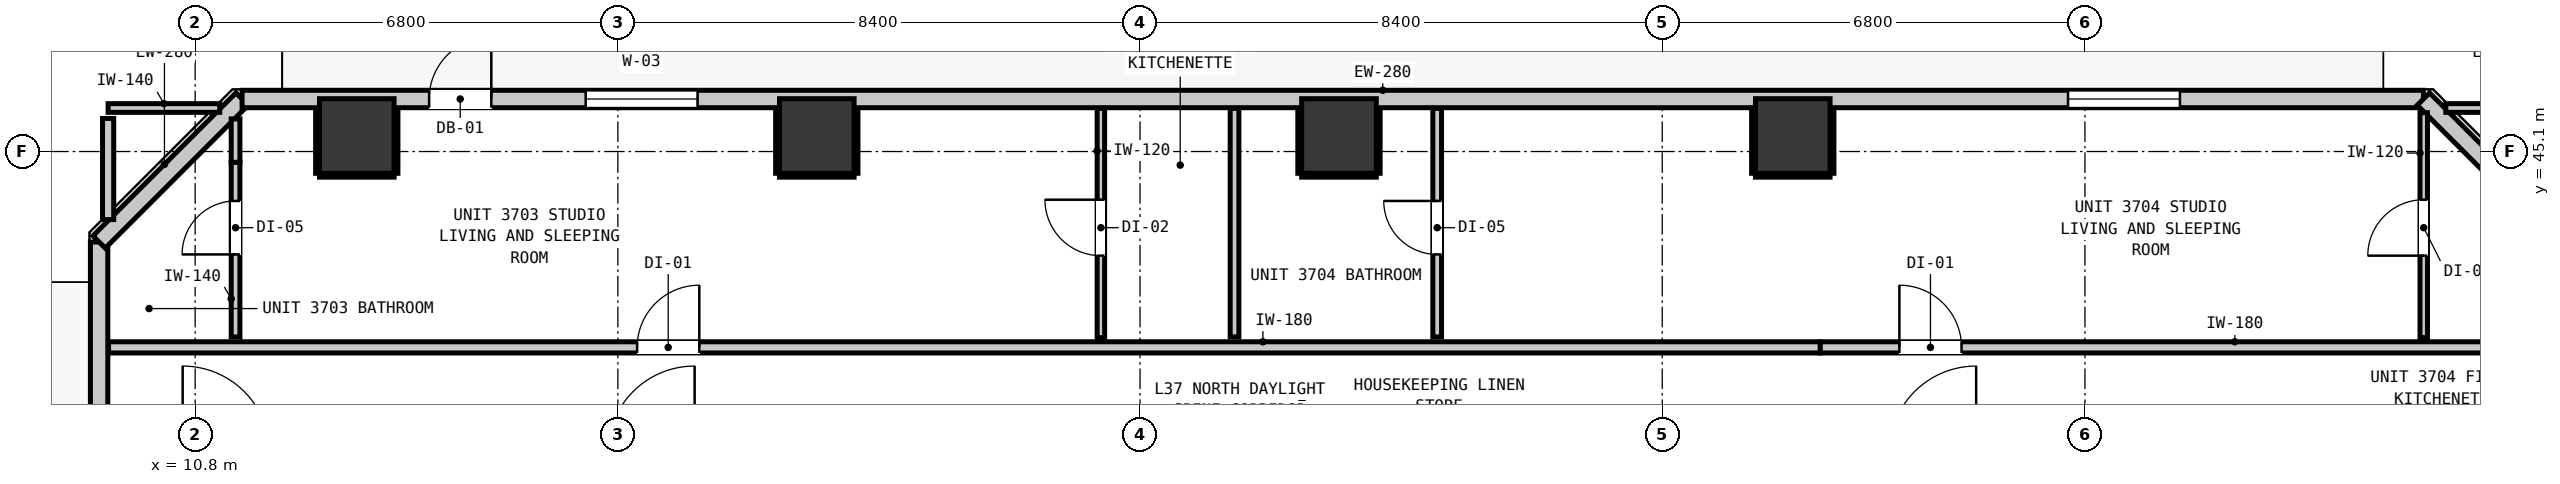
"""IFC4 building model, lengths in metres.
Left out: names, types, materials, properties, quantities, classifications, styles, units other than length and angle.
Written with IfcOpenShell. Run it as: python <this file> out.ifc"""

import sys

from ifc_helpers import new_model, si_unit, direction, frame, frame_2d, origin, origin_2d, place, context, subcontext, project, spatial, rectangle, extrude, element, fill, save


model = new_model("IFC4")
c1 = context("Model", 3, precision=1e-05, world=origin(), true_north=direction((0.0, 1.0)))
c2 = subcontext(c1, "Body", "Model", "MODEL_VIEW")
j1 = project(units=[si_unit("LENGTHUNIT", "METRE"), si_unit("PLANEANGLEUNIT", "RADIAN")], contexts=[c1])
p1 = place(None, origin())
s1 = spatial("IfcSite", under=j1, at=p1, CompositionType="ELEMENT")
p2 = place(p1, origin())
s2 = spatial("IfcBuilding", under=s1, at=p2, CompositionType="ELEMENT")
p3 = place(p2, frame((0.0, 0.0, 129.32)))
s3 = spatial("IfcBuildingStorey", under=s2, at=p3, CompositionType="ELEMENT", Elevation=129.32)
for number, where, z_axis, x_axis in (
    (1, (13.4, 45.35, 0.0), (0.0, 0.0, 1.0), (1.0, 0.0, 0.0)),
    (2, (20.8, 45.35, 0.0), (0.0, 0.0, 1.0), (1.0, 0.0, 0.0)),
    (3, (29.2, 45.35, 0.0), (0.0, 0.0, 1.0), (1.0, 0.0, 0.0)),
    (4, (36.5, 45.35, 0.0), (0.0, 0.0, 1.0), (1.0, 0.0, 0.0)),
):
    element("IfcColumn", number, at=place(p3, frame(where, z_axis=z_axis, x_axis=x_axis)), inside=s3, PredefinedType="COLUMN", context=c2, shape_type="SweptSolid", body=[
        extrude(rectangle(XDim=1.2, YDim=1.2, at=origin_2d()), origin(), (0.0, 0.0, 1.0), 3.32),
    ])
p4 = place(p3, frame((9.255, 11.355, 0.0), z_axis=(0.0, 0.0, 1.0), x_axis=(0.0, 1.0, 0.0)))
e5 = element("IfcWall", 5, at=p4, inside=s3, PredefinedType="STANDARD", context=c2, shape_type="SweptSolid", body=[
    extrude(rectangle(XDim=32.29, YDim=0.28, at=frame_2d((16.145, 0.0))), origin(), (0.0, 0.0, 1.0), 3.08),
])
p5 = place(p4, frame((5.818, 0.0, 0.0)))
e6 = element("IfcOpeningElement", 6, at=p5, cuts=e5, PredefinedType="OPENING", context=c2, shape_type="SweptSolid", body=[
    extrude(rectangle(XDim=1.0, YDim=2.15, at=frame_2d((0.5, 1.075))), frame((0.0, 0.15, 0.0), z_axis=(0.0, -1.0, 0.0), x_axis=(1.0, 0.0, 0.0)), (0.0, 0.0, 1.0), 0.3),
])
p6 = place(p4, frame((0.544, 0.0, 0.85)))
e7 = element("IfcOpeningElement", 7, at=p6, cuts=e5, PredefinedType="OPENING", context=c2, shape_type="SweptSolid", body=[
    extrude(rectangle(XDim=1.05, YDim=1.65, at=frame_2d((0.525, 0.825))), frame((0.0, 0.15, 0.0), z_axis=(0.0, -1.0, 0.0), x_axis=(1.0, 0.0, 0.0)), (0.0, 0.0, 1.0), 0.3),
])
p7 = place(p3, frame((9.255, 43.645, 0.0), z_axis=(0.0, 0.0, 1.0), x_axis=(0.707106781187, 0.707106781187, 0.0)))
e8 = element("IfcWall", 8, at=p7, inside=s3, PredefinedType="STANDARD", context=c2, shape_type="SweptSolid", body=[
    extrude(rectangle(XDim=3.253, YDim=0.28, at=frame_2d((1.626, 0.0))), origin(), (0.0, 0.0, 1.0), 3.08),
])
p8 = place(p3, frame((11.555, 45.945, 0.0), z_axis=(0.0, 0.0, 1.0), x_axis=(1.0, 0.0, 0.0)))
e9 = element("IfcWall", 9, at=p8, inside=s3, PredefinedType="STANDARD", context=c2, shape_type="SweptSolid", body=[
    extrude(rectangle(XDim=35.09, YDim=0.28, at=frame_2d((17.545, 0.0))), origin(), (0.0, 0.0, 1.0), 3.08),
])
p9 = place(p8, frame((3.009, 0.0, 0.0)))
e10 = element("IfcOpeningElement", 10, at=p9, cuts=e9, PredefinedType="OPENING", context=c2, shape_type="SweptSolid", body=[
    extrude(rectangle(XDim=1.0, YDim=2.15, at=frame_2d((0.5, 1.075))), frame((0.0, 0.15, 0.0), z_axis=(0.0, -1.0, 0.0), x_axis=(1.0, 0.0, 0.0)), (0.0, 0.0, 1.0), 0.3),
])
p10 = place(p8, frame((5.527, 0.0, 0.85)))
e11 = element("IfcOpeningElement", 11, at=p10, cuts=e9, PredefinedType="OPENING", context=c2, shape_type="SweptSolid", body=[
    extrude(rectangle(XDim=1.8, YDim=1.9, at=frame_2d((0.9, 0.95))), frame((0.0, 0.15, 0.0), z_axis=(0.0, -1.0, 0.0), x_axis=(1.0, 0.0, 0.0)), (0.0, 0.0, 1.0), 0.3),
])
p11 = place(p8, frame((29.373, 0.0, 0.85)))
e12 = element("IfcOpeningElement", 12, at=p11, cuts=e9, PredefinedType="OPENING", context=c2, shape_type="SweptSolid", body=[
    extrude(rectangle(XDim=1.8, YDim=1.9, at=frame_2d((0.9, 0.95))), frame((0.0, 0.15, 0.0), z_axis=(0.0, -1.0, 0.0), x_axis=(1.0, 0.0, 0.0)), (0.0, 0.0, 1.0), 0.3),
])
p12 = place(p3, frame((46.645, 45.945, 0.0), z_axis=(0.0, 0.0, 1.0), x_axis=(0.707106781187, -0.707106781187, 0.0)))
e13 = element("IfcWall", 13, at=p12, inside=s3, PredefinedType="STANDARD", context=c2, shape_type="SweptSolid", body=[
    extrude(rectangle(XDim=3.253, YDim=0.28, at=frame_2d((1.626, 0.0))), origin(), (0.0, 0.0, 1.0), 3.08),
])
p13 = place(p3, frame((9.407, 41.95, 0.0), z_axis=(0.0, 0.0, 1.0), x_axis=(1.0, 0.0, 0.0)))
e14 = element("IfcWall", 14, at=p13, inside=s3, PredefinedType="PARTITIONING", context=c2, shape_type="SweptSolid", body=[
    extrude(rectangle(XDim=27.536, YDim=0.18, at=frame_2d((13.768, 0.0))), origin(), (0.0, 0.0, 1.0), 3.08),
])
p14 = place(p13, frame((8.503, 0.0, 0.0)))
e15 = element("IfcOpeningElement", 15, at=p14, cuts=e14, PredefinedType="OPENING", context=c2, shape_type="SweptSolid", body=[
    extrude(rectangle(XDim=1.0, YDim=2.15, at=frame_2d((0.5, 1.075))), frame((0.0, 0.1, 0.0), z_axis=(0.0, -1.0, 0.0), x_axis=(1.0, 0.0, 0.0)), (0.0, 0.0, 1.0), 0.2),
])
p15 = place(p3, frame((36.943, 41.95, 0.0), z_axis=(0.0, 0.0, 1.0), x_axis=(1.0, 0.0, 0.0)))
e16 = element("IfcWall", 16, at=p15, inside=s3, PredefinedType="PARTITIONING", context=c2, shape_type="SweptSolid", body=[
    extrude(rectangle(XDim=10.964, YDim=0.18, at=frame_2d((5.482, 0.0))), origin(), (0.0, 0.0, 1.0), 2.565),
])
p16 = place(p15, frame((1.272, 0.0, 0.0)))
e17 = element("IfcOpeningElement", 17, at=p16, cuts=e16, PredefinedType="OPENING", context=c2, shape_type="SweptSolid", body=[
    extrude(rectangle(XDim=1.0, YDim=2.15, at=frame_2d((0.5, 1.075))), frame((0.0, 0.1, 0.0), z_axis=(0.0, -1.0, 0.0), x_axis=(1.0, 0.0, 0.0)), (0.0, 0.0, 1.0), 0.2),
])
for number, where, z_axis, x_axis in (
    (18, (9.4, 45.8, 0.0), (0.0, 0.0, 1.0), (1.0, 0.0, 0.0)),
    (19, (47.005, 45.8, 0.0), (0.0, 0.0, 1.0), (1.0, 0.0, 0.0)),
):
    element("IfcWall", number, at=place(p3, frame(where, z_axis=z_axis, x_axis=x_axis)), inside=s3, PredefinedType="PARTITIONING", context=c2, shape_type="SweptSolid", body=[
        extrude(rectangle(XDim=1.795, YDim=0.14, at=frame_2d((0.897, 0.0))), origin(), (0.0, 0.0, 1.0), 3.08),
    ])
p17 = place(p3, frame((9.4, 44.005, 0.0), z_axis=(0.0, 0.0, 1.0), x_axis=(0.0, 1.0, 0.0)))
e20 = element("IfcWall", 20, at=p17, inside=s3, PredefinedType="PARTITIONING", context=c2, shape_type="SweptSolid", body=[
    extrude(rectangle(XDim=1.627, YDim=0.18, at=frame_2d((0.813, 0.0))), origin(), (0.0, 0.0, 1.0), 3.08),
])
p18 = place(p3, frame((11.45, 42.118, 0.0), z_axis=(0.0, 0.0, 1.0), x_axis=(0.0, 1.0, 0.0)))
e21 = element("IfcWall", 21, at=p18, inside=s3, PredefinedType="PARTITIONING", context=c2, shape_type="SweptSolid", body=[
    extrude(rectangle(XDim=2.808, YDim=0.14, at=frame_2d((1.404, 0.0))), origin(), (0.0, 0.0, 1.0), 2.565),
])
p19 = place(p18, frame((1.327, 0.0, 0.0)))
e22 = element("IfcOpeningElement", 22, at=p19, cuts=e21, PredefinedType="OPENING", context=c2, shape_type="SweptSolid", body=[
    extrude(rectangle(XDim=0.86, YDim=2.02, at=frame_2d((0.43, 1.01))), frame((0.0, 0.08, 0.0), z_axis=(0.0, -1.0, 0.0), x_axis=(1.0, 0.0, 0.0)), (0.0, 0.0, 1.0), 0.16),
])
p20 = place(p3, frame((11.45, 44.926, 0.0), z_axis=(0.0, 0.0, 1.0), x_axis=(0.0, 1.0, 0.0)))
e23 = element("IfcWall", 23, at=p20, inside=s3, PredefinedType="PARTITIONING", context=c2, shape_type="SweptSolid", body=[
    extrude(rectangle(XDim=0.699, YDim=0.14, at=frame_2d((0.35, 0.0))), origin(), (0.0, 0.0, 1.0), 3.08),
])
p21 = place(p3, frame((27.52, 42.118, 0.0), z_axis=(0.0, 0.0, 1.0), x_axis=(0.0, 1.0, 0.0)))
e24 = element("IfcWall", 24, at=p21, inside=s3, PredefinedType="PARTITIONING", context=c2, shape_type="SweptSolid", body=[
    extrude(rectangle(XDim=3.675, YDim=0.14, at=frame_2d((1.837, 0.0))), origin(), (0.0, 0.0, 1.0), 3.08),
])
p22 = place(p3, frame((30.78, 42.118, 0.0), z_axis=(0.0, 0.0, 1.0), x_axis=(0.0, 1.0, 0.0)))
e25 = element("IfcWall", 25, at=p22, inside=s3, PredefinedType="PARTITIONING", context=c2, shape_type="SweptSolid", body=[
    extrude(rectangle(XDim=3.675, YDim=0.14, at=frame_2d((1.837, 0.0))), origin(), (0.0, 0.0, 1.0), 3.08),
])
p23 = place(p22, frame((1.327, 0.0, 0.0)))
e26 = element("IfcOpeningElement", 26, at=p23, cuts=e25, PredefinedType="OPENING", context=c2, shape_type="SweptSolid", body=[
    extrude(rectangle(XDim=0.86, YDim=2.02, at=frame_2d((0.43, 1.01))), frame((0.0, 0.08, 0.0), z_axis=(0.0, -1.0, 0.0), x_axis=(1.0, 0.0, 0.0)), (0.0, 0.0, 1.0), 0.16),
])
p24 = place(p3, frame((25.37, 42.108, 0.0), z_axis=(0.0, 0.0, 1.0), x_axis=(0.0, 1.0, 0.0)))
e27 = element("IfcWall", 27, at=p24, inside=s3, PredefinedType="PARTITIONING", context=c2, shape_type="SweptSolid", body=[
    extrude(rectangle(XDim=3.685, YDim=0.12, at=frame_2d((1.843, 0.0))), origin(), (0.0, 0.0, 1.0), 3.08),
])
p25 = place(p24, frame((1.317, 0.0, 0.0)))
e28 = element("IfcOpeningElement", 28, at=p25, cuts=e27, PredefinedType="OPENING", context=c2, shape_type="SweptSolid", body=[
    extrude(rectangle(XDim=0.9, YDim=2.1, at=frame_2d((0.45, 1.05))), frame((0.0, 0.07, 0.0), z_axis=(0.0, -1.0, 0.0), x_axis=(1.0, 0.0, 0.0)), (0.0, 0.0, 1.0), 0.14),
])
p26 = place(p3, frame((46.65, 42.108, 0.0), z_axis=(0.0, 0.0, 1.0), x_axis=(0.0, 1.0, 0.0)))
e29 = element("IfcWall", 29, at=p26, inside=s3, PredefinedType="PARTITIONING", context=c2, shape_type="SweptSolid", body=[
    extrude(rectangle(XDim=3.617, YDim=0.12, at=frame_2d((1.809, 0.0))), origin(), (0.0, 0.0, 1.0), 3.08),
])
p27 = place(p26, frame((1.317, 0.0, 0.0)))
e30 = element("IfcOpeningElement", 30, at=p27, cuts=e29, PredefinedType="OPENING", context=c2, shape_type="SweptSolid", body=[
    extrude(rectangle(XDim=0.9, YDim=2.1, at=frame_2d((0.45, 1.05))), frame((0.0, 0.07, 0.0), z_axis=(0.0, -1.0, 0.0), x_axis=(1.0, 0.0, 0.0)), (0.0, 0.0, 1.0), 0.14),
])
p28 = place(p3, frame((12.8, 44.718, 0.0), z_axis=(0.0, 0.0, 1.0), x_axis=(1.0, 0.0, 0.0)))
e31 = element("IfcWall", 31, at=p28, inside=s3, PredefinedType="PARTITIONING", context=c2, shape_type="SweptSolid", body=[
    extrude(rectangle(XDim=1.2, YDim=0.06, at=frame_2d((0.6, 0.0))), origin(), (0.0, 0.0, 1.0), 1.45),
])
for number, where, z_axis, x_axis in (
    (32, (12.768, 44.75, 0.0), (0.0, 0.0, 1.0), (0.0, 1.0, 0.0)),
    (33, (14.032, 44.75, 0.0), (0.0, 0.0, 1.0), (0.0, 1.0, 0.0)),
):
    element("IfcWall", number, at=place(p3, frame(where, z_axis=z_axis, x_axis=x_axis)), inside=s3, PredefinedType="PARTITIONING", context=c2, shape_type="SweptSolid", body=[
        extrude(rectangle(XDim=1.04, YDim=0.06, at=frame_2d((0.52, 0.0))), origin(), (0.0, 0.0, 1.0), 1.45),
    ])
p29 = place(p3, frame((20.2, 44.718, 0.0), z_axis=(0.0, 0.0, 1.0), x_axis=(1.0, 0.0, 0.0)))
e34 = element("IfcWall", 34, at=p29, inside=s3, PredefinedType="PARTITIONING", context=c2, shape_type="SweptSolid", body=[
    extrude(rectangle(XDim=1.2, YDim=0.06, at=frame_2d((0.6, 0.0))), origin(), (0.0, 0.0, 1.0), 1.45),
])
for number, where, z_axis, x_axis in (
    (35, (20.168, 44.75, 0.0), (0.0, 0.0, 1.0), (0.0, 1.0, 0.0)),
    (36, (21.432, 44.75, 0.0), (0.0, 0.0, 1.0), (0.0, 1.0, 0.0)),
):
    element("IfcWall", number, at=place(p3, frame(where, z_axis=z_axis, x_axis=x_axis)), inside=s3, PredefinedType="PARTITIONING", context=c2, shape_type="SweptSolid", body=[
        extrude(rectangle(XDim=1.04, YDim=0.06, at=frame_2d((0.52, 0.0))), origin(), (0.0, 0.0, 1.0), 1.45),
    ])
p30 = place(p3, frame((28.6, 44.718, 0.0), z_axis=(0.0, 0.0, 1.0), x_axis=(1.0, 0.0, 0.0)))
e37 = element("IfcWall", 37, at=p30, inside=s3, PredefinedType="PARTITIONING", context=c2, shape_type="SweptSolid", body=[
    extrude(rectangle(XDim=1.2, YDim=0.06, at=frame_2d((0.6, 0.0))), origin(), (0.0, 0.0, 1.0), 1.45),
])
for number, where, z_axis, x_axis in (
    (38, (28.568, 44.75, 0.0), (0.0, 0.0, 1.0), (0.0, 1.0, 0.0)),
    (39, (29.832, 44.75, 0.0), (0.0, 0.0, 1.0), (0.0, 1.0, 0.0)),
):
    element("IfcWall", number, at=place(p3, frame(where, z_axis=z_axis, x_axis=x_axis)), inside=s3, PredefinedType="PARTITIONING", context=c2, shape_type="SweptSolid", body=[
        extrude(rectangle(XDim=1.04, YDim=0.06, at=frame_2d((0.52, 0.0))), origin(), (0.0, 0.0, 1.0), 1.45),
    ])
p31 = place(p3, frame((35.9, 44.718, 0.0), z_axis=(0.0, 0.0, 1.0), x_axis=(1.0, 0.0, 0.0)))
e40 = element("IfcWall", 40, at=p31, inside=s3, PredefinedType="PARTITIONING", context=c2, shape_type="SweptSolid", body=[
    extrude(rectangle(XDim=1.2, YDim=0.06, at=frame_2d((0.6, 0.0))), origin(), (0.0, 0.0, 1.0), 1.45),
])
for number, where, z_axis, x_axis in (
    (41, (35.868, 44.75, 0.0), (0.0, 0.0, 1.0), (0.0, 1.0, 0.0)),
    (42, (37.132, 44.75, 0.0), (0.0, 0.0, 1.0), (0.0, 1.0, 0.0)),
):
    element("IfcWall", number, at=place(p3, frame(where, z_axis=z_axis, x_axis=x_axis)), inside=s3, PredefinedType="PARTITIONING", context=c2, shape_type="SweptSolid", body=[
        extrude(rectangle(XDim=1.04, YDim=0.06, at=frame_2d((0.52, 0.0))), origin(), (0.0, 0.0, 1.0), 1.45),
    ])
p32 = place(p9, origin())
e43 = element("IfcDoor", 43, at=p32, inside=s3, OperationType="SINGLE_SWING_RIGHT", PredefinedType="DOOR", context=c2, shape_type="SweptSolid", body=[
    extrude(rectangle(XDim=1.0, YDim=2.15, at=frame_2d((0.5, 1.075))), frame((0.0, 0.025, 0.0), z_axis=(0.0, -1.0, 0.0), x_axis=(1.0, 0.0, 0.0)), (0.0, 0.0, 1.0), 0.05),
])
fill(e10, e43)
p33 = place(p10, origin())
e44 = element("IfcWindow", 44, at=p33, inside=s3, PartitioningType="SINGLE_PANEL", PredefinedType="WINDOW", context=c2, shape_type="SweptSolid", body=[
    extrude(rectangle(XDim=1.8, YDim=1.9, at=frame_2d((0.9, 0.95))), frame((0.0, 0.03, 0.0), z_axis=(0.0, -1.0, 0.0), x_axis=(1.0, 0.0, 0.0)), (0.0, 0.0, 1.0), 0.06),
])
fill(e11, e44)
p34 = place(p11, origin())
e45 = element("IfcWindow", 45, at=p34, inside=s3, PartitioningType="SINGLE_PANEL", PredefinedType="WINDOW", context=c2, shape_type="SweptSolid", body=[
    extrude(rectangle(XDim=1.8, YDim=1.9, at=frame_2d((0.9, 0.95))), frame((0.0, 0.03, 0.0), z_axis=(0.0, -1.0, 0.0), x_axis=(1.0, 0.0, 0.0)), (0.0, 0.0, 1.0), 0.06),
])
fill(e12, e45)
p35 = place(p14, origin())
e46 = element("IfcDoor", 46, at=p35, inside=s3, OperationType="SINGLE_SWING_RIGHT", PredefinedType="DOOR", context=c2, shape_type="SweptSolid", body=[
    extrude(rectangle(XDim=1.0, YDim=2.15, at=frame_2d((0.5, 1.075))), frame((0.0, 0.025, 0.0), z_axis=(0.0, -1.0, 0.0), x_axis=(1.0, 0.0, 0.0)), (0.0, 0.0, 1.0), 0.05),
])
fill(e15, e46)
p36 = place(p19, origin())
e47 = element("IfcDoor", 47, at=p36, inside=s3, OperationType="SINGLE_SWING_LEFT", PredefinedType="DOOR", context=c2, shape_type="SweptSolid", body=[
    extrude(rectangle(XDim=0.86, YDim=2.02, at=frame_2d((0.43, 1.01))), frame((0.0, 0.025, 0.0), z_axis=(0.0, -1.0, 0.0), x_axis=(1.0, 0.0, 0.0)), (0.0, 0.0, 1.0), 0.05),
])
fill(e22, e47)
p37 = place(p25, origin())
e48 = element("IfcDoor", 48, at=p37, inside=s3, OperationType="SINGLE_SWING_RIGHT", PredefinedType="DOOR", context=c2, shape_type="SweptSolid", body=[
    extrude(rectangle(XDim=0.9, YDim=2.1, at=frame_2d((0.45, 1.05))), frame((0.0, 0.025, 0.0), z_axis=(0.0, -1.0, 0.0), x_axis=(1.0, 0.0, 0.0)), (0.0, 0.0, 1.0), 0.05),
])
fill(e28, e48)
p38 = place(p16, origin())
e49 = element("IfcDoor", 49, at=p38, inside=s3, OperationType="SINGLE_SWING_LEFT", PredefinedType="DOOR", context=c2, shape_type="SweptSolid", body=[
    extrude(rectangle(XDim=1.0, YDim=2.15, at=frame_2d((0.5, 1.075))), frame((0.0, 0.025, 0.0), z_axis=(0.0, -1.0, 0.0), x_axis=(1.0, 0.0, 0.0)), (0.0, 0.0, 1.0), 0.05),
])
fill(e17, e49)
p39 = place(p23, origin())
e50 = element("IfcDoor", 50, at=p39, inside=s3, OperationType="SINGLE_SWING_RIGHT", PredefinedType="DOOR", context=c2, shape_type="SweptSolid", body=[
    extrude(rectangle(XDim=0.86, YDim=2.02, at=frame_2d((0.43, 1.01))), frame((0.0, 0.025, 0.0), z_axis=(0.0, -1.0, 0.0), x_axis=(1.0, 0.0, 0.0)), (0.0, 0.0, 1.0), 0.05),
])
fill(e26, e50)
p40 = place(p27, origin())
e51 = element("IfcDoor", 51, at=p40, inside=s3, OperationType="SINGLE_SWING_LEFT", PredefinedType="DOOR", context=c2, shape_type="SweptSolid", body=[
    extrude(rectangle(XDim=0.9, YDim=2.1, at=frame_2d((0.45, 1.05))), frame((0.0, 0.025, 0.0), z_axis=(0.0, -1.0, 0.0), x_axis=(1.0, 0.0, 0.0)), (0.0, 0.0, 1.0), 0.05),
])
fill(e30, e51)
save(model, sys.argv[1])
